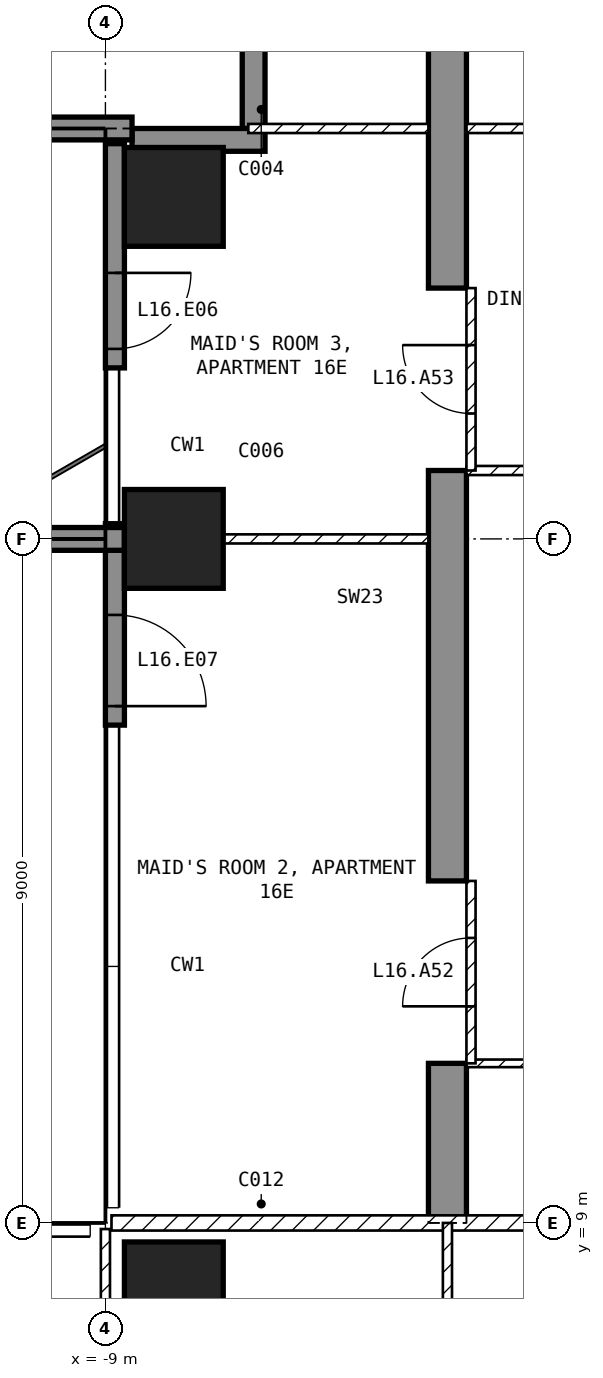
"""IFC4 building model, lengths in metres.
Left out: names, types, materials, properties, quantities, classifications, styles, units other than length and angle.
Written with IfcOpenShell. Run it as: python <this file> out.ifc"""

import sys

from ifc_helpers import new_model, si_unit, direction, frame, frame_2d, origin, origin_2d, place, context, subcontext, project, spatial, polyline, rectangle, outline, extrude, element, fill, save


model = new_model("IFC4")
c1 = context("Model", 3, precision=1e-05, world=origin(), true_north=direction((0.0, 1.0)))
c2 = subcontext(c1, "Body", "Model", "MODEL_VIEW")
j1 = project(units=[si_unit("LENGTHUNIT", "METRE"), si_unit("PLANEANGLEUNIT", "RADIAN")], contexts=[c1])
p1 = place(None, origin())
s1 = spatial("IfcSite", under=j1, at=p1, CompositionType="ELEMENT")
p2 = place(p1, origin())
s2 = spatial("IfcBuilding", under=s1, at=p2, CompositionType="ELEMENT")
p3 = place(p2, frame((0.0, 0.0, 75.0)))
s3 = spatial("IfcBuildingStorey", under=s2, at=p3, CompositionType="ELEMENT", Elevation=75.0)
for number, where, z_axis, x_axis in (
    (1, (-8.1, 8.1, -0.25), (0.0, 0.0, 1.0), (1.0, 0.0, 0.0)),
    (2, (-8.1, 18.0, -0.25), (0.0, 0.0, 1.0), (1.0, 0.0, 0.0)),
    (3, (-8.1, 22.5, -0.25), (0.0, 0.0, 1.0), (1.0, 0.0, 0.0)),
):
    element("IfcColumn", number, at=place(p3, frame(where, z_axis=z_axis, x_axis=x_axis)), inside=s3, PredefinedType="COLUMN", context=c2, shape_type="SweptSolid", body=[
        extrude(rectangle(XDim=1.3, YDim=1.3, at=origin_2d()), origin(), (0.0, 0.0, 1.0), 3.5),
    ])
p4 = place(p3, frame((-4.75, 9.0, -0.25), z_axis=(1.0, 0.0, 0.0), x_axis=(0.0, 1.0, 0.0)))
e4 = element("IfcWall", 4, at=p4, inside=s3, PredefinedType="SHEAR", context=c2, shape_type="SweptSolid", body=[
    extrude(outline(polyline([(0.0, 0.0), (2.1, 0.0), (2.1, 2.65), (4.5, 2.65), (4.5, 0.0), (9.9, 0.0), (9.9, 2.65), (12.3, 2.65), (12.3, 0.0), (16.45, 0.0), (16.45, 3.5), (0.0, 3.5), (0.0, 0.0)])), origin(), (0.0, 0.0, 1.0), 0.5),
])
p5 = place(p3, frame((-8.875, 23.2, 0.0), z_axis=(0.0, 0.0, 1.0), x_axis=(0.0, -1.0, 0.0)))
e5 = element("IfcWall", 5, at=p5, inside=s3, PredefinedType="SOLIDWALL", context=c2, shape_type="SweptSolid", body=[
    extrude(rectangle(XDim=2.95, YDim=0.25, at=frame_2d((1.475, 0.0))), origin(), (0.0, 0.0, 1.0), 3.25),
])
p6 = place(p5, frame((1.7, 0.0, 0.0)))
e6 = element("IfcOpeningElement", 6, at=p6, cuts=e5, PredefinedType="OPENING", context=c2, shape_type="SweptSolid", body=[
    extrude(rectangle(XDim=1.0, YDim=2.4, at=frame_2d((0.5, 1.2))), frame((0.0, 0.135, 0.0), z_axis=(0.0, -1.0, 0.0), x_axis=(1.0, 0.0, 0.0)), (0.0, 0.0, 1.0), 0.27),
])
p7 = place(p3, frame((-8.875, 18.2, 0.0), z_axis=(0.0, 0.0, 1.0), x_axis=(0.0, -1.0, 0.0)))
e7 = element("IfcWall", 7, at=p7, inside=s3, PredefinedType="SOLIDWALL", context=c2, shape_type="SweptSolid", body=[
    extrude(rectangle(XDim=2.65, YDim=0.25, at=frame_2d((1.325, 0.0))), origin(), (0.0, 0.0, 1.0), 3.25),
])
p8 = place(p7, frame((1.2, 0.0, 0.0)))
e8 = element("IfcOpeningElement", 8, at=p8, cuts=e7, PredefinedType="OPENING", context=c2, shape_type="SweptSolid", body=[
    extrude(rectangle(XDim=1.2, YDim=2.4, at=frame_2d((0.6, 1.2))), frame((0.0, 0.135, 0.0), z_axis=(0.0, -1.0, 0.0), x_axis=(1.0, 0.0, 0.0)), (0.0, 0.0, 1.0), 0.27),
])
p9 = place(p3, frame((-7.05, 25.2, 0.0), z_axis=(0.0, 0.0, 1.0), x_axis=(0.0, -1.0, 0.0)))
e9 = element("IfcWall", 9, at=p9, inside=s3, PredefinedType="SOLIDWALL", context=c2, shape_type="SweptSolid", body=[
    extrude(rectangle(XDim=1.8, YDim=0.3, at=frame_2d((0.9, 0.0))), origin(), (0.0, 0.0, 1.0), 3.25),
])
p10 = place(p3, frame((-6.9, 23.25, 0.0), z_axis=(0.0, 0.0, 1.0), x_axis=(-1.0, 0.0, 0.0)))
e10 = element("IfcWall", 10, at=p10, inside=s3, PredefinedType="SOLIDWALL", context=c2, shape_type="SweptSolid", body=[
    extrude(rectangle(XDim=1.75, YDim=0.3, at=frame_2d((0.875, 0.0))), origin(), (0.0, 0.0, 1.0), 3.25),
])
p11 = place(p3, frame((-8.75, 18.0, 0.0), z_axis=(0.0, 0.0, 1.0), x_axis=(-1.0, 0.0, 0.0)))
e11 = element("IfcWall", 11, at=p11, inside=s3, PredefinedType="SOLIDWALL", context=c2, shape_type="SweptSolid", body=[
    extrude(rectangle(XDim=2.95, YDim=0.3, at=frame_2d((1.475, 0.0))), origin(), (0.0, 0.0, 1.0), 3.25),
])
p12 = place(p3, frame((-8.65, 23.4, 0.0), z_axis=(0.0, 0.0, 1.0), x_axis=(-1.0, 0.0, 0.0)))
e12 = element("IfcWall", 12, at=p12, inside=s3, PredefinedType="SOLIDWALL", context=c2, shape_type="SweptSolid", body=[
    extrude(rectangle(XDim=3.05, YDim=0.3, at=frame_2d((1.525, 0.0))), origin(), (0.0, 0.0, 1.0), 3.25),
])
p13 = place(p3, frame((-8.92, 9.0, 0.0), z_axis=(0.0, 0.0, 1.0), x_axis=(1.0, 0.0, 0.0)))
e13 = element("IfcWall", 13, at=p13, inside=s3, PredefinedType="PARTITIONING", context=c2, shape_type="SweptSolid", body=[
    extrude(rectangle(XDim=17.84, YDim=0.2, at=frame_2d((8.92, 0.0))), origin(), (0.0, 0.0, 1.0), 3.25),
])
p14 = place(p13, frame((8.42, 0.0, 0.0)))
e14 = element("IfcOpeningElement", 14, at=p14, cuts=e13, PredefinedType="OPENING", context=c2, shape_type="SweptSolid", body=[
    extrude(rectangle(XDim=1.0, YDim=2.1, at=frame_2d((0.5, 1.05))), frame((0.0, 0.11, 0.0), z_axis=(0.0, -1.0, 0.0), x_axis=(1.0, 0.0, 0.0)), (0.0, 0.0, 1.0), 0.22),
])
p15 = place(p3, frame((-9.0, 8.92, 0.0), z_axis=(0.0, 0.0, 1.0), x_axis=(0.0, -1.0, 0.0)))
e15 = element("IfcWall", 15, at=p15, inside=s3, PredefinedType="PARTITIONING", context=c2, shape_type="SweptSolid", body=[
    extrude(rectangle(XDim=4.36, YDim=0.12, at=frame_2d((2.18, 0.0))), origin(), (0.0, 0.0, 1.0), 3.25),
])
p16 = place(p15, frame((2.69, 0.0, 0.0)))
e16 = element("IfcOpeningElement", 16, at=p16, cuts=e15, PredefinedType="OPENING", context=c2, shape_type="SweptSolid", body=[
    extrude(rectangle(XDim=0.9, YDim=2.1, at=frame_2d((0.45, 1.05))), frame((0.0, 0.07, 0.0), z_axis=(0.0, -1.0, 0.0), x_axis=(1.0, 0.0, 0.0)), (0.0, 0.0, 1.0), 0.14),
])
p17 = place(p3, frame((-4.5, 9.0, 0.0), z_axis=(0.0, 0.0, 1.0), x_axis=(0.0, -1.0, 0.0)))
e17 = element("IfcWall", 17, at=p17, inside=s3, PredefinedType="PARTITIONING", context=c2, shape_type="SweptSolid", body=[
    extrude(rectangle(XDim=7.7, YDim=0.12, at=frame_2d((3.85, 0.0))), origin(), (0.0, 0.0, 1.0), 3.25),
])
p18 = place(p17, frame((1.812, 0.0, 0.0)))
e18 = element("IfcOpeningElement", 18, at=p18, cuts=e17, PredefinedType="OPENING", context=c2, shape_type="SweptSolid", body=[
    extrude(rectangle(XDim=0.9, YDim=2.1, at=frame_2d((0.45, 1.05))), frame((0.0, 0.07, 0.0), z_axis=(0.0, -1.0, 0.0), x_axis=(1.0, 0.0, 0.0)), (0.0, 0.0, 1.0), 0.14),
])
p19 = place(p3, frame((-4.25, 11.1, 0.0), z_axis=(0.0, 0.0, 1.0), x_axis=(1.0, 0.0, 0.0)))
e19 = element("IfcWall", 19, at=p19, inside=s3, PredefinedType="PARTITIONING", context=c2, shape_type="SweptSolid", body=[
    extrude(rectangle(XDim=2.15, YDim=0.1, at=frame_2d((1.075, 0.0))), origin(), (0.0, 0.0, 1.0), 3.25),
])
p20 = place(p3, frame((-4.25, 18.9, 0.0), z_axis=(0.0, 0.0, 1.0), x_axis=(1.0, 0.0, 0.0)))
e20 = element("IfcWall", 20, at=p20, inside=s3, PredefinedType="PARTITIONING", context=c2, shape_type="SweptSolid", body=[
    extrude(rectangle(XDim=8.5, YDim=0.12, at=frame_2d((4.25, 0.0))), origin(), (0.0, 0.0, 1.0), 3.25),
])
p21 = place(p20, frame((1.925, 0.0, 0.0)))
e21 = element("IfcOpeningElement", 21, at=p21, cuts=e20, PredefinedType="OPENING", context=c2, shape_type="SweptSolid", body=[
    extrude(rectangle(XDim=0.9, YDim=2.1, at=frame_2d((0.45, 1.05))), frame((0.0, 0.07, 0.0), z_axis=(0.0, -1.0, 0.0), x_axis=(1.0, 0.0, 0.0)), (0.0, 0.0, 1.0), 0.14),
])
p22 = place(p3, frame((-4.25, 23.4, 0.0), z_axis=(0.0, 0.0, 1.0), x_axis=(1.0, 0.0, 0.0)))
e22 = element("IfcWall", 22, at=p22, inside=s3, PredefinedType="PARTITIONING", context=c2, shape_type="SweptSolid", body=[
    extrude(rectangle(XDim=8.5, YDim=0.12, at=frame_2d((4.25, 0.0))), origin(), (0.0, 0.0, 1.0), 3.25),
])
p23 = place(p22, frame((1.925, 0.0, 0.0)))
e23 = element("IfcOpeningElement", 23, at=p23, cuts=e22, PredefinedType="OPENING", context=c2, shape_type="SweptSolid", body=[
    extrude(rectangle(XDim=0.9, YDim=2.1, at=frame_2d((0.45, 1.05))), frame((0.0, 0.07, 0.0), z_axis=(0.0, -1.0, 0.0), x_axis=(1.0, 0.0, 0.0)), (0.0, 0.0, 1.0), 0.14),
])
p24 = place(p3, frame((-7.45, 18.0, 0.0), z_axis=(0.0, 0.0, 1.0), x_axis=(1.0, 0.0, 0.0)))
e24 = element("IfcWall", 24, at=p24, inside=s3, PredefinedType="PARTITIONING", context=c2, shape_type="SweptSolid", body=[
    extrude(rectangle(XDim=2.7, YDim=0.12, at=frame_2d((1.35, 0.0))), origin(), (0.0, 0.0, 1.0), 2.346),
])
p25 = place(p3, frame((-7.12, 23.4, 0.0), z_axis=(0.0, 0.0, 1.0), x_axis=(1.0, 0.0, 0.0)))
e25 = element("IfcWall", 25, at=p25, inside=s3, PredefinedType="PARTITIONING", context=c2, shape_type="SweptSolid", body=[
    extrude(rectangle(XDim=2.37, YDim=0.12, at=frame_2d((1.185, 0.0))), origin(), (0.0, 0.0, 1.0), 3.25),
])
p26 = place(p3, frame((-4.19, 11.1, 0.0), z_axis=(0.0, 0.0, 1.0), x_axis=(0.0, 1.0, 0.0)))
e26 = element("IfcWall", 26, at=p26, inside=s3, PredefinedType="PARTITIONING", context=c2, shape_type="SweptSolid", body=[
    extrude(rectangle(XDim=2.4, YDim=0.12, at=frame_2d((1.2, 0.0))), origin(), (0.0, 0.0, 1.0), 2.4),
])
p27 = place(p26, frame((0.75, 0.0, 0.0)))
e27 = element("IfcOpeningElement", 27, at=p27, cuts=e26, PredefinedType="OPENING", context=c2, shape_type="SweptSolid", body=[
    extrude(rectangle(XDim=0.9, YDim=2.1, at=frame_2d((0.45, 1.05))), frame((0.0, 0.07, 0.0), z_axis=(0.0, -1.0, 0.0), x_axis=(1.0, 0.0, 0.0)), (0.0, 0.0, 1.0), 0.14),
])
p28 = place(p3, frame((-4.19, 18.9, 0.0), z_axis=(0.0, 0.0, 1.0), x_axis=(0.0, 1.0, 0.0)))
e28 = element("IfcWall", 28, at=p28, inside=s3, PredefinedType="PARTITIONING", context=c2, shape_type="SweptSolid", body=[
    extrude(rectangle(XDim=2.4, YDim=0.12, at=frame_2d((1.2, 0.0))), origin(), (0.0, 0.0, 1.0), 2.4),
])
p29 = place(p28, frame((0.75, 0.0, 0.0)))
e29 = element("IfcOpeningElement", 29, at=p29, cuts=e28, PredefinedType="OPENING", context=c2, shape_type="SweptSolid", body=[
    extrude(rectangle(XDim=0.9, YDim=2.1, at=frame_2d((0.45, 1.05))), frame((0.0, 0.07, 0.0), z_axis=(0.0, -1.0, 0.0), x_axis=(1.0, 0.0, 0.0)), (0.0, 0.0, 1.0), 0.14),
])
p30 = place(p6, origin())
e30 = element("IfcDoor", 30, at=p30, inside=s3, OperationType="SINGLE_SWING_LEFT", PredefinedType="DOOR", context=c2, shape_type="SweptSolid", body=[
    extrude(rectangle(XDim=1.0, YDim=2.4, at=frame_2d((0.5, 1.2))), frame((0.0, 0.025, 0.0), z_axis=(0.0, -1.0, 0.0), x_axis=(1.0, 0.0, 0.0)), (0.0, 0.0, 1.0), 0.05),
])
fill(e6, e30)
p31 = place(p8, origin())
e31 = element("IfcDoor", 31, at=p31, inside=s3, OperationType="SINGLE_SWING_RIGHT", PredefinedType="DOOR", context=c2, shape_type="SweptSolid", body=[
    extrude(rectangle(XDim=1.2, YDim=2.4, at=frame_2d((0.6, 1.2))), frame((0.0, 0.025, 0.0), z_axis=(0.0, -1.0, 0.0), x_axis=(1.0, 0.0, 0.0)), (0.0, 0.0, 1.0), 0.05),
])
fill(e8, e31)
p32 = place(p27, origin())
e32 = element("IfcDoor", 32, at=p32, inside=s3, OperationType="SINGLE_SWING_LEFT", PredefinedType="DOOR", context=c2, shape_type="SweptSolid", body=[
    extrude(rectangle(XDim=0.9, YDim=2.1, at=frame_2d((0.45, 1.05))), frame((0.0, 0.025, 0.0), z_axis=(0.0, -1.0, 0.0), x_axis=(1.0, 0.0, 0.0)), (0.0, 0.0, 1.0), 0.05),
])
fill(e27, e32)
p33 = place(p29, origin())
e33 = element("IfcDoor", 33, at=p33, inside=s3, OperationType="SINGLE_SWING_RIGHT", PredefinedType="DOOR", context=c2, shape_type="SweptSolid", body=[
    extrude(rectangle(XDim=0.9, YDim=2.1, at=frame_2d((0.45, 1.05))), frame((0.0, 0.025, 0.0), z_axis=(0.0, -1.0, 0.0), x_axis=(1.0, 0.0, 0.0)), (0.0, 0.0, 1.0), 0.05),
])
fill(e29, e33)
save(model, sys.argv[1])
